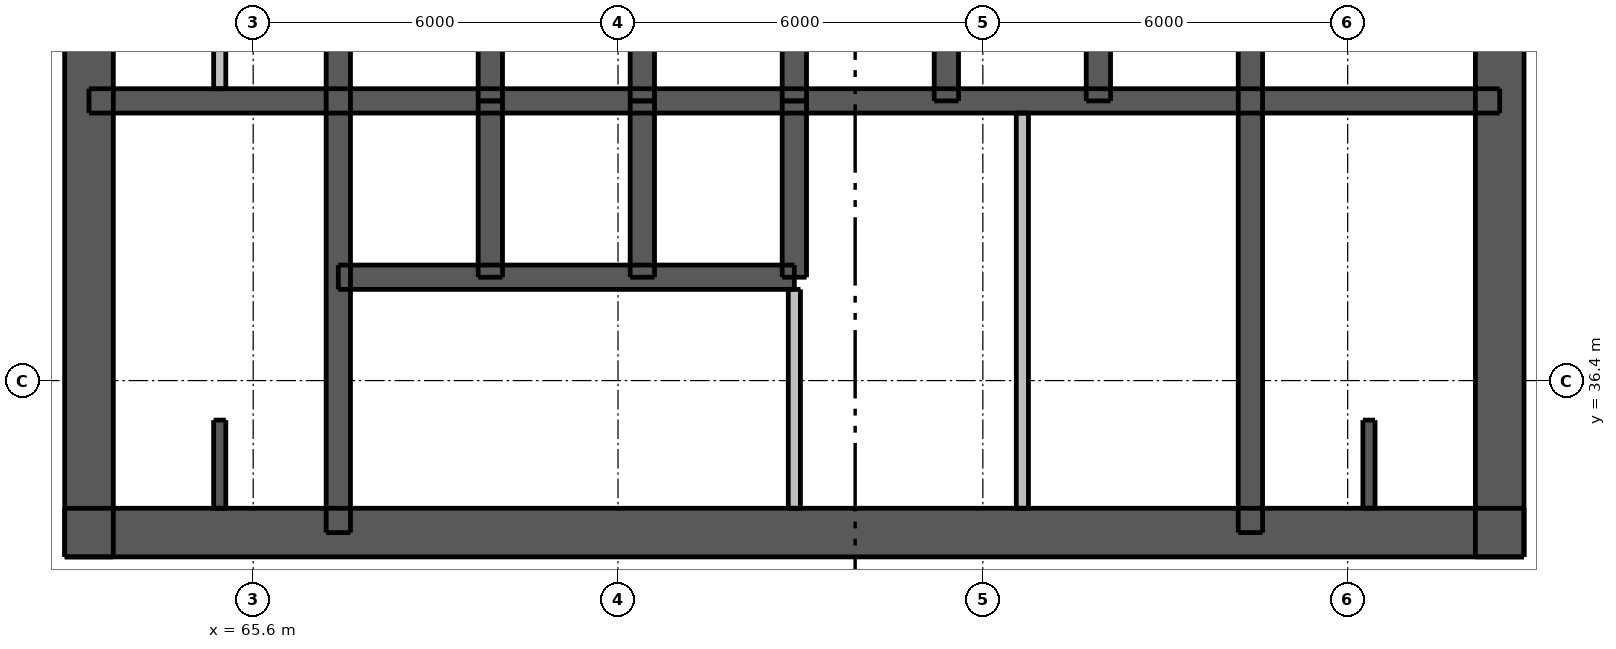
"""IFC4 building model, lengths in metres.
Left out: names, types, materials, properties, quantities, classifications, styles, units other than length and angle.
Written with IfcOpenShell. Run it as: python <this file> out.ifc"""

import sys

from ifc_helpers import new_model, si_unit, direction, frame, frame_2d, origin, place, context, subcontext, project, spatial, rectangle, extrude, element, fill, save


model = new_model("IFC4")
c1 = context("Model", 3, precision=1e-05, world=origin(), true_north=direction((0.0, 1.0)))
c2 = subcontext(c1, "Body", "Model", "MODEL_VIEW")
j1 = project(units=[si_unit("LENGTHUNIT", "METRE"), si_unit("PLANEANGLEUNIT", "RADIAN")], contexts=[c1])
p1 = place(None, origin())
s1 = spatial("IfcSite", under=j1, at=p1, CompositionType="ELEMENT")
p2 = place(p1, origin())
s2 = spatial("IfcBuilding", under=s1, at=p2, CompositionType="ELEMENT")
p3 = place(p2, frame((0.0, 0.0, 124.9)))
s3 = spatial("IfcBuildingStorey", under=s2, at=p3, CompositionType="ELEMENT", Elevation=124.9)
p4 = place(p3, frame((62.5, 33.9, 0.0), z_axis=(0.0, 0.0, 1.0), x_axis=(1.0, 0.0, 0.0)))
e1 = element("IfcWall", 1, at=p4, inside=s3, PredefinedType="SHEAR", context=c2, shape_type="SweptSolid", body=[
    extrude(rectangle(XDim=24.0, YDim=0.8, at=frame_2d((12.0, 0.0))), origin(), (0.0, 0.0, 1.0), 8.75),
])
p5 = place(p4, frame((3.0, 0.0, 0.0)))
e2 = element("IfcOpeningElement", 2, at=p5, cuts=e1, PredefinedType="OPENING", context=c2, shape_type="SweptSolid", body=[
    extrude(rectangle(XDim=1.1, YDim=2.1, at=frame_2d((0.55, 1.05))), frame((0.0, 0.41, 0.0), z_axis=(0.0, -1.0, 0.0), x_axis=(1.0, 0.0, 0.0)), (0.0, 0.0, 1.0), 0.82),
])
p6 = place(p4, frame((1.0, 0.0, 0.0)))
e3 = element("IfcOpeningElement", 3, at=p6, cuts=e1, PredefinedType="OPENING", context=c2, shape_type="SweptSolid", body=[
    extrude(rectangle(XDim=1.1, YDim=2.1, at=frame_2d((0.55, 1.05))), frame((0.0, 0.41, 0.0), z_axis=(0.0, -1.0, 0.0), x_axis=(1.0, 0.0, 0.0)), (0.0, 0.0, 1.0), 0.82),
])
p7 = place(p4, frame((21.9, 0.0, 0.0)))
e4 = element("IfcOpeningElement", 4, at=p7, cuts=e1, PredefinedType="OPENING", context=c2, shape_type="SweptSolid", body=[
    extrude(rectangle(XDim=1.1, YDim=2.1, at=frame_2d((0.55, 1.05))), frame((0.0, 0.41, 0.0), z_axis=(0.0, -1.0, 0.0), x_axis=(1.0, 0.0, 0.0)), (0.0, 0.0, 1.0), 0.82),
])
p8 = place(p4, frame((19.9, 0.0, 0.0)))
e5 = element("IfcOpeningElement", 5, at=p8, cuts=e1, PredefinedType="OPENING", context=c2, shape_type="SweptSolid", body=[
    extrude(rectangle(XDim=1.1, YDim=2.1, at=frame_2d((0.55, 1.05))), frame((0.0, 0.41, 0.0), z_axis=(0.0, -1.0, 0.0), x_axis=(1.0, 0.0, 0.0)), (0.0, 0.0, 1.0), 0.82),
])
p9 = place(p4, frame((7.05, 0.0, 0.0)))
e6 = element("IfcOpeningElement", 6, at=p9, cuts=e1, PredefinedType="OPENING", context=c2, shape_type="SweptSolid", body=[
    extrude(rectangle(XDim=1.1, YDim=2.1, at=frame_2d((0.55, 1.05))), frame((0.0, 0.41, 0.0), z_axis=(0.0, -1.0, 0.0), x_axis=(1.0, 0.0, 0.0)), (0.0, 0.0, 1.0), 0.82),
])
p10 = place(p4, frame((13.25, 0.0, 0.0)))
e7 = element("IfcOpeningElement", 7, at=p10, cuts=e1, PredefinedType="OPENING", context=c2, shape_type="SweptSolid", body=[
    extrude(rectangle(XDim=0.9, YDim=2.1, at=frame_2d((0.45, 1.05))), frame((0.0, 0.41, 0.0), z_axis=(0.0, -1.0, 0.0), x_axis=(1.0, 0.0, 0.0)), (0.0, 0.0, 1.0), 0.82),
])
p11 = place(p4, frame((17.075, 0.0, 0.0)))
e8 = element("IfcOpeningElement", 8, at=p11, cuts=e1, PredefinedType="OPENING", context=c2, shape_type="SweptSolid", body=[
    extrude(rectangle(XDim=0.9, YDim=2.1, at=frame_2d((0.45, 1.05))), frame((0.0, 0.41, 0.0), z_axis=(0.0, -1.0, 0.0), x_axis=(1.0, 0.0, 0.0)), (0.0, 0.0, 1.0), 0.82),
])
p12 = place(p3, frame((62.9, 33.5, 0.0), z_axis=(0.0, 0.0, 1.0), x_axis=(0.0, 1.0, 0.0)))
e9 = element("IfcWall", 9, at=p12, inside=s3, PredefinedType="SHEAR", context=c2, shape_type="SweptSolid", body=[
    extrude(rectangle(XDim=24.0, YDim=0.8, at=frame_2d((12.0, 0.0))), origin(), (0.0, 0.0, 1.0), 8.75),
])
p13 = place(p12, frame((11.2, 0.0, 0.0)))
e10 = element("IfcOpeningElement", 10, at=p13, cuts=e9, PredefinedType="OPENING", context=c2, shape_type="SweptSolid", body=[
    extrude(rectangle(XDim=1.6, YDim=2.1, at=frame_2d((0.8, 1.05))), frame((0.0, 0.41, 0.0), z_axis=(0.0, -1.0, 0.0), x_axis=(1.0, 0.0, 0.0)), (0.0, 0.0, 1.0), 0.82),
])
p14 = place(p3, frame((86.1, 33.5, 0.0), z_axis=(0.0, 0.0, 1.0), x_axis=(0.0, 1.0, 0.0)))
e11 = element("IfcWall", 11, at=p14, inside=s3, PredefinedType="SHEAR", context=c2, shape_type="SweptSolid", body=[
    extrude(rectangle(XDim=24.0, YDim=0.8, at=frame_2d((12.0, 0.0))), origin(), (0.0, 0.0, 1.0), 8.75),
])
p15 = place(p14, frame((11.2, 0.0, 0.0)))
e12 = element("IfcOpeningElement", 12, at=p15, cuts=e11, PredefinedType="OPENING", context=c2, shape_type="SweptSolid", body=[
    extrude(rectangle(XDim=1.6, YDim=2.1, at=frame_2d((0.8, 1.05))), frame((0.0, 0.41, 0.0), z_axis=(0.0, -1.0, 0.0), x_axis=(1.0, 0.0, 0.0)), (0.0, 0.0, 1.0), 0.82),
])
p16 = place(p3, frame((62.9, 41.0, 0.0), z_axis=(0.0, 0.0, 1.0), x_axis=(1.0, 0.0, 0.0)))
e13 = element("IfcWall", 13, at=p16, inside=s3, PredefinedType="SHEAR", context=c2, shape_type="SweptSolid", body=[
    extrude(rectangle(XDim=23.2, YDim=0.4, at=frame_2d((11.6, 0.0))), origin(), (0.0, 0.0, 1.0), 8.75),
])
for number, where, z_axis, x_axis in (
    (14, (67.0, 33.9, 0.0), (0.0, 0.0, 1.0), (0.0, 1.0, 0.0)),
    (15, (82.0, 33.9, 0.0), (0.0, 0.0, 1.0), (0.0, 1.0, 0.0)),
):
    element("IfcWall", number, at=place(p3, frame(where, z_axis=z_axis, x_axis=x_axis)), inside=s3, PredefinedType="SHEAR", context=c2, shape_type="SweptSolid", body=[
        extrude(rectangle(XDim=10.0, YDim=0.4, at=frame_2d((5.0, 0.0))), origin(), (0.0, 0.0, 1.0), 8.75),
    ])
for number, where, z_axis, x_axis in (
    (16, (69.5, 41.0, 0.0), (0.0, 0.0, 1.0), (0.0, 1.0, 0.0)),
    (17, (72.0, 41.0, 0.0), (0.0, 0.0, 1.0), (0.0, 1.0, 0.0)),
    (18, (74.5, 41.0, 0.0), (0.0, 0.0, 1.0), (0.0, 1.0, 0.0)),
    (19, (77.0, 41.0, 0.0), (0.0, 0.0, 1.0), (0.0, 1.0, 0.0)),
    (20, (79.5, 41.0, 0.0), (0.0, 0.0, 1.0), (0.0, 1.0, 0.0)),
):
    element("IfcWall", number, at=place(p3, frame(where, z_axis=z_axis, x_axis=x_axis)), inside=s3, PredefinedType="SHEAR", context=c2, shape_type="SweptSolid", body=[
        extrude(rectangle(XDim=2.9, YDim=0.4, at=frame_2d((1.45, 0.0))), origin(), (0.0, 0.0, 1.0), 8.75),
    ])
p17 = place(p3, frame((67.0, 38.1, 0.0), z_axis=(0.0, 0.0, 1.0), x_axis=(1.0, 0.0, 0.0)))
e21 = element("IfcWall", 21, at=p17, inside=s3, PredefinedType="SHEAR", context=c2, shape_type="SweptSolid", body=[
    extrude(rectangle(XDim=7.5, YDim=0.4, at=frame_2d((3.75, 0.0))), origin(), (0.0, 0.0, 1.0), 8.75),
])
p18 = place(p17, frame((0.7, 0.0, 0.0)))
e22 = element("IfcOpeningElement", 22, at=p18, cuts=e21, PredefinedType="OPENING", context=c2, shape_type="SweptSolid", body=[
    extrude(rectangle(XDim=1.1, YDim=2.1, at=frame_2d((0.55, 1.05))), frame((0.0, 0.21, 0.0), z_axis=(0.0, -1.0, 0.0), x_axis=(1.0, 0.0, 0.0)), (0.0, 0.0, 1.0), 0.42),
])
p19 = place(p17, frame((3.2, 0.0, 0.0)))
e23 = element("IfcOpeningElement", 23, at=p19, cuts=e21, PredefinedType="OPENING", context=c2, shape_type="SweptSolid", body=[
    extrude(rectangle(XDim=1.1, YDim=2.1, at=frame_2d((0.55, 1.05))), frame((0.0, 0.21, 0.0), z_axis=(0.0, -1.0, 0.0), x_axis=(1.0, 0.0, 0.0)), (0.0, 0.0, 1.0), 0.42),
])
p20 = place(p17, frame((5.65, 0.0, 0.0)))
e24 = element("IfcOpeningElement", 24, at=p20, cuts=e21, PredefinedType="OPENING", context=c2, shape_type="SweptSolid", body=[
    extrude(rectangle(XDim=1.2, YDim=2.1, at=frame_2d((0.6, 1.05))), frame((0.0, 0.21, 0.0), z_axis=(0.0, -1.0, 0.0), x_axis=(1.0, 0.0, 0.0)), (0.0, 0.0, 1.0), 0.42),
])
for number, where, z_axis, x_axis in (
    (25, (69.5, 38.1, 0.0), (0.0, 0.0, 1.0), (0.0, 1.0, 0.0)),
    (26, (72.0, 38.1, 0.0), (0.0, 0.0, 1.0), (0.0, 1.0, 0.0)),
    (27, (74.5, 38.1, 0.0), (0.0, 0.0, 1.0), (0.0, 1.0, 0.0)),
):
    element("IfcWall", number, at=place(p3, frame(where, z_axis=z_axis, x_axis=x_axis)), inside=s3, PredefinedType="SHEAR", context=c2, shape_type="SweptSolid", body=[
        extrude(rectangle(XDim=2.9, YDim=0.4, at=frame_2d((1.45, 0.0))), origin(), (0.0, 0.0, 1.0), 8.75),
    ])
p21 = place(p3, frame((74.5, 34.3, 0.0), z_axis=(0.0, 0.0, 1.0), x_axis=(0.0, 1.0, 0.0)))
e28 = element("IfcWall", 28, at=p21, inside=s3, PredefinedType="PLUMBINGWALL", context=c2, shape_type="SweptSolid", body=[
    extrude(rectangle(XDim=3.6, YDim=0.2, at=frame_2d((1.8, 0.0))), origin(), (0.0, 0.0, 1.0), 8.75),
])
p22 = place(p3, frame((78.25, 34.3, 0.0), z_axis=(0.0, 0.0, 1.0), x_axis=(0.0, 1.0, 0.0)))
e29 = element("IfcWall", 29, at=p22, inside=s3, PredefinedType="PLUMBINGWALL", context=c2, shape_type="SweptSolid", body=[
    extrude(rectangle(XDim=6.5, YDim=0.2, at=frame_2d((3.25, 0.0))), origin(), (0.0, 0.0, 1.0), 8.75),
])
p23 = place(p3, frame((65.05, 41.2, 0.0), z_axis=(0.0, 0.0, 1.0), x_axis=(0.0, 1.0, 0.0)))
e30 = element("IfcWall", 30, at=p23, inside=s3, PredefinedType="PLUMBINGWALL", context=c2, shape_type="SweptSolid", body=[
    extrude(rectangle(XDim=2.5, YDim=0.2, at=frame_2d((1.25, 0.0))), origin(), (0.0, 0.0, 1.0), 8.75),
])
for number, where, z_axis, x_axis in (
    (31, (65.05, 34.3, 0.0), (0.0, 0.0, 1.0), (0.0, 1.0, 0.0)),
    (32, (83.95, 34.3, 0.0), (0.0, 0.0, 1.0), (0.0, 1.0, 0.0)),
):
    element("IfcWall", number, at=place(p3, frame(where, z_axis=z_axis, x_axis=x_axis)), inside=s3, PredefinedType="SHEAR", context=c2, shape_type="SweptSolid", body=[
        extrude(rectangle(XDim=1.45, YDim=0.2, at=frame_2d((0.725, 0.0))), origin(), (0.0, 0.0, 1.0), 8.75),
    ])
p24 = place(p5, origin())
e33 = element("IfcDoor", 33, at=p24, inside=s3, OperationType="SINGLE_SWING_LEFT", PredefinedType="DOOR", context=c2, shape_type="SweptSolid", body=[
    extrude(rectangle(XDim=1.1, YDim=2.1, at=frame_2d((0.55, 1.05))), frame((0.0, 0.388, 0.0), z_axis=(0.0, -1.0, 0.0), x_axis=(1.0, 0.0, 0.0)), (0.0, 0.0, 1.0), 0.05),
])
fill(e2, e33)
p25 = place(p6, origin())
e34 = element("IfcDoor", 34, at=p25, inside=s3, OperationType="SINGLE_SWING_LEFT", PredefinedType="DOOR", context=c2, shape_type="SweptSolid", body=[
    extrude(rectangle(XDim=1.1, YDim=2.1, at=frame_2d((0.55, 1.05))), frame((0.0, 0.388, 0.0), z_axis=(0.0, -1.0, 0.0), x_axis=(1.0, 0.0, 0.0)), (0.0, 0.0, 1.0), 0.05),
])
fill(e3, e34)
p26 = place(p7, origin())
e35 = element("IfcDoor", 35, at=p26, inside=s3, OperationType="SINGLE_SWING_RIGHT", PredefinedType="DOOR", context=c2, shape_type="SweptSolid", body=[
    extrude(rectangle(XDim=1.1, YDim=2.1, at=frame_2d((0.55, 1.05))), frame((0.0, 0.388, 0.0), z_axis=(0.0, -1.0, 0.0), x_axis=(1.0, 0.0, 0.0)), (0.0, 0.0, 1.0), 0.05),
])
fill(e4, e35)
p27 = place(p8, origin())
e36 = element("IfcDoor", 36, at=p27, inside=s3, OperationType="SINGLE_SWING_RIGHT", PredefinedType="DOOR", context=c2, shape_type="SweptSolid", body=[
    extrude(rectangle(XDim=1.1, YDim=2.1, at=frame_2d((0.55, 1.05))), frame((0.0, 0.388, 0.0), z_axis=(0.0, -1.0, 0.0), x_axis=(1.0, 0.0, 0.0)), (0.0, 0.0, 1.0), 0.05),
])
fill(e5, e36)
p28 = place(p9, origin())
e37 = element("IfcDoor", 37, at=p28, inside=s3, OperationType="SINGLE_SWING_LEFT", PredefinedType="DOOR", context=c2, shape_type="SweptSolid", body=[
    extrude(rectangle(XDim=1.1, YDim=2.1, at=frame_2d((0.55, 1.05))), frame((0.0, 0.388, 0.0), z_axis=(0.0, -1.0, 0.0), x_axis=(1.0, 0.0, 0.0)), (0.0, 0.0, 1.0), 0.05),
])
fill(e6, e37)
p29 = place(p10, origin())
e38 = element("IfcDoor", 38, at=p29, inside=s3, OperationType="SINGLE_SWING_LEFT", PredefinedType="DOOR", context=c2, shape_type="SweptSolid", body=[
    extrude(rectangle(XDim=0.9, YDim=2.1, at=frame_2d((0.45, 1.05))), frame((0.0, 0.388, 0.0), z_axis=(0.0, -1.0, 0.0), x_axis=(1.0, 0.0, 0.0)), (0.0, 0.0, 1.0), 0.05),
])
fill(e7, e38)
p30 = place(p11, origin())
e39 = element("IfcDoor", 39, at=p30, inside=s3, OperationType="SINGLE_SWING_LEFT", PredefinedType="DOOR", context=c2, shape_type="SweptSolid", body=[
    extrude(rectangle(XDim=0.9, YDim=2.1, at=frame_2d((0.45, 1.05))), frame((0.0, 0.388, 0.0), z_axis=(0.0, -1.0, 0.0), x_axis=(1.0, 0.0, 0.0)), (0.0, 0.0, 1.0), 0.05),
])
fill(e8, e39)
p31 = place(p18, origin())
e40 = element("IfcDoor", 40, at=p31, inside=s3, OperationType="DOUBLE_DOOR_SLIDING", PredefinedType="DOOR", context=c2, shape_type="SweptSolid", body=[
    extrude(rectangle(XDim=1.1, YDim=2.1, at=frame_2d((0.55, 1.05))), frame((0.0, 0.025, 0.0), z_axis=(0.0, -1.0, 0.0), x_axis=(1.0, 0.0, 0.0)), (0.0, 0.0, 1.0), 0.05),
])
fill(e22, e40)
p32 = place(p19, origin())
e41 = element("IfcDoor", 41, at=p32, inside=s3, OperationType="DOUBLE_DOOR_SLIDING", PredefinedType="DOOR", context=c2, shape_type="SweptSolid", body=[
    extrude(rectangle(XDim=1.1, YDim=2.1, at=frame_2d((0.55, 1.05))), frame((0.0, 0.025, 0.0), z_axis=(0.0, -1.0, 0.0), x_axis=(1.0, 0.0, 0.0)), (0.0, 0.0, 1.0), 0.05),
])
fill(e23, e41)
p33 = place(p20, origin())
e42 = element("IfcDoor", 42, at=p33, inside=s3, OperationType="DOUBLE_DOOR_SLIDING", PredefinedType="DOOR", context=c2, shape_type="SweptSolid", body=[
    extrude(rectangle(XDim=1.2, YDim=2.1, at=frame_2d((0.6, 1.05))), frame((0.0, 0.025, 0.0), z_axis=(0.0, -1.0, 0.0), x_axis=(1.0, 0.0, 0.0)), (0.0, 0.0, 1.0), 0.05),
])
fill(e24, e42)
save(model, sys.argv[1])
